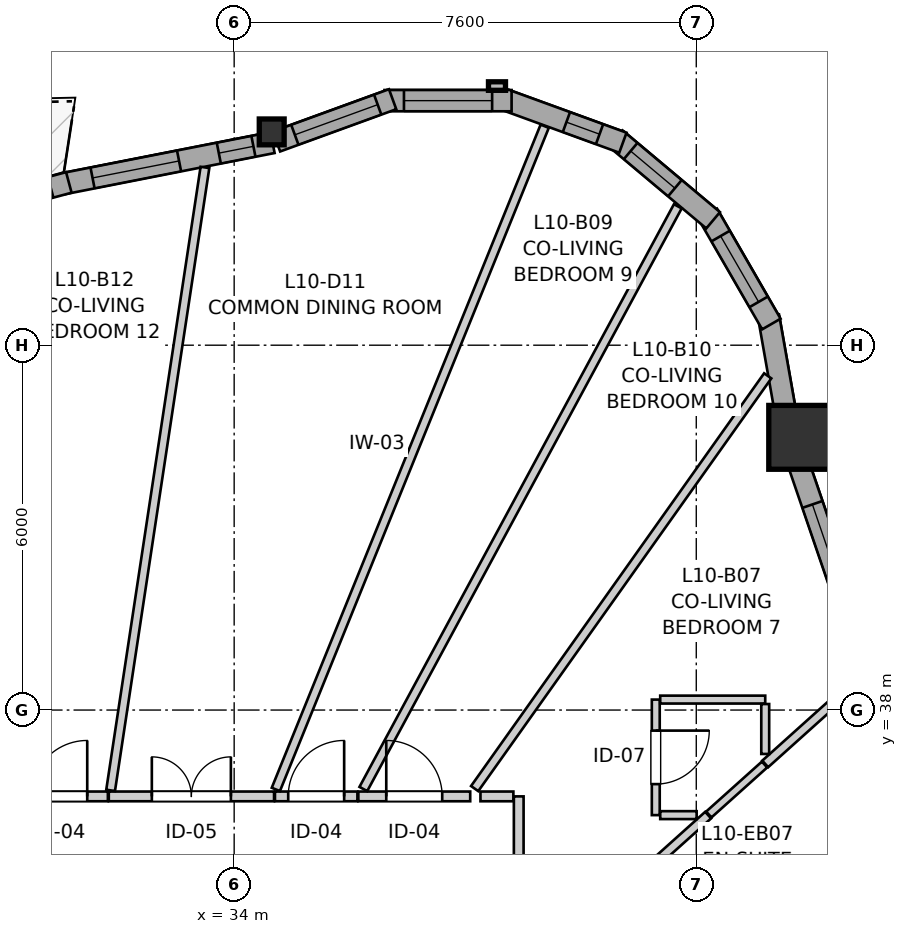
"""IFC4 building model, lengths in metres.
Left out: names, types, materials, properties, quantities, classifications, styles, units other than length and angle.
Written with IfcOpenShell. Run it as: python <this file> out.ifc"""

import sys

from ifc_helpers import new_model, si_unit, direction, frame, frame_2d, origin, origin_2d, place, context, subcontext, project, spatial, rectangle, i_section, extrude, source, transform, mapped, element, fill, save


model = new_model("IFC4")
c1 = context("Model", 3, precision=1e-05, world=origin(), true_north=direction((0.0, 1.0)))
c2 = subcontext(c1, "Body", "Model", "MODEL_VIEW")
j1 = project(units=[si_unit("LENGTHUNIT", "METRE"), si_unit("PLANEANGLEUNIT", "RADIAN")], contexts=[c1])
p1 = place(None, origin())
s1 = spatial("IfcSite", under=j1, at=p1, CompositionType="ELEMENT")
p2 = place(p1, origin())
s2 = spatial("IfcBuilding", under=s1, at=p2, CompositionType="ELEMENT")
p3 = place(p2, frame((0.0, 0.0, 36.6)))
s3 = spatial("IfcBuildingStorey", under=s2, at=p3, CompositionType="ELEMENT", Elevation=36.6)
m1 = source(origin(), c2, "Body", "SweptSolid", [
    extrude(rectangle(XDim=1.05, YDim=1.05, at=origin_2d()), origin(), (0.0, 0.0, 1.0), 2.94),
])
p4 = place(p3, frame((43.317, 42.485, 0.0), z_axis=(0.0, 0.0, 1.0), x_axis=(1.0, 0.0, 0.0)))
e1 = element("IfcColumn", 1, at=p4, inside=s3, PredefinedType="COLUMN", context=c2, shape_type="MappedRepresentation", body=[
    mapped(m1, transform((0.0, 0.0, 0.0), x_axis=(1.0, 0.0, 0.0), y_axis=(0.0, 1.0, 0.0), z_axis=(0.0, 0.0, 1.0), scale=1.0)),
])
m2 = source(origin(), c2, "Body", "SweptSolid", [
    extrude(i_section(OverallWidth=0.409, OverallDepth=0.425, WebThickness=0.03, FlangeThickness=0.048, FilletRadius=0.015, at=origin_2d()), origin(), (0.0, 0.0, 1.0), 2.94),
])
p5 = place(p3, frame((34.617, 47.508, 0.0), z_axis=(0.0, 0.0, 1.0), x_axis=(1.0, 0.0, 0.0)))
e2 = element("IfcColumn", 2, at=p5, inside=s3, PredefinedType="PILASTER", context=c2, shape_type="MappedRepresentation", body=[
    mapped(m2, transform((0.0, 0.0, 0.0), x_axis=(1.0, 0.0, 0.0), y_axis=(0.0, 1.0, 0.0), z_axis=(0.0, 0.0, 1.0), scale=1.0)),
])
p6 = place(p3, frame((44.292, 39.095, 0.0), z_axis=(0.0, 0.0, 1.0), x_axis=(-0.323582370233, 0.946200005112, 0.0)))
e3 = element("IfcWall", 3, at=p6, inside=s3, PredefinedType="SOLIDWALL", context=c2, shape_type="SweptSolid", body=[
    extrude(rectangle(XDim=3.222, YDim=0.35, at=frame_2d((1.611, 0.0))), origin(), (0.0, 0.0, 1.0), 2.42),
])
p7 = place(p6, frame((0.816, 0.0, 0.82)))
e4 = element("IfcOpeningElement", 4, at=p7, cuts=e3, PredefinedType="OPENING", context=c2, shape_type="SweptSolid", body=[
    extrude(rectangle(XDim=1.6, YDim=1.35, at=frame_2d((0.8, 0.675))), frame((0.0, 0.185, 0.0), z_axis=(0.0, -1.0, 0.0), x_axis=(1.0, 0.0, 0.0)), (0.0, 0.0, 1.0), 0.37),
])
p8 = place(p3, frame((43.093, 42.75, 0.0), z_axis=(0.0, 0.0, 1.0), x_axis=(-0.173610462023, 0.984814402553, 0.0)))
e5 = element("IfcWall", 5, at=p8, inside=s3, PredefinedType="SOLIDWALL", context=c2, shape_type="SweptSolid", body=[
    extrude(rectangle(XDim=1.752, YDim=0.35, at=frame_2d((0.876, 0.0))), origin(), (0.0, 0.0, 1.0), 2.42),
])
p9 = place(p3, frame((42.835, 44.348, 0.0), z_axis=(0.0, 0.0, 1.0), x_axis=(-0.499995423472, 0.866028046028, 0.0)))
e6 = element("IfcWall", 6, at=p9, inside=s3, PredefinedType="SOLIDWALL", context=c2, shape_type="SweptSolid", body=[
    extrude(rectangle(XDim=2.09, YDim=0.35, at=frame_2d((1.045, 0.0))), origin(), (0.0, 0.0, 1.0), 2.42),
])
p10 = place(p9, frame((0.42, 0.0, 0.82)))
e7 = element("IfcOpeningElement", 7, at=p10, cuts=e6, PredefinedType="OPENING", context=c2, shape_type="SweptSolid", body=[
    extrude(rectangle(XDim=1.25, YDim=1.35, at=frame_2d((0.625, 0.675))), frame((0.0, 0.185, 0.0), z_axis=(0.0, -1.0, 0.0), x_axis=(1.0, 0.0, 0.0)), (0.0, 0.0, 1.0), 0.37),
])
p11 = place(p3, frame((41.877, 46.054, 0.0), z_axis=(0.0, 0.0, 1.0), x_axis=(-0.766024572719, 0.642811289563, 0.0)))
e8 = element("IfcWall", 8, at=p11, inside=s3, PredefinedType="SOLIDWALL", context=c2, shape_type="SweptSolid", body=[
    extrude(rectangle(XDim=2.09, YDim=0.35, at=frame_2d((1.045, 0.0))), origin(), (0.0, 0.0, 1.0), 2.42),
])
p12 = place(p11, frame((0.821, 0.0, 0.82)))
e9 = element("IfcOpeningElement", 9, at=p12, cuts=e8, PredefinedType="OPENING", context=c2, shape_type="SweptSolid", body=[
    extrude(rectangle(XDim=0.95, YDim=1.35, at=frame_2d((0.475, 0.675))), frame((0.0, 0.185, 0.0), z_axis=(0.0, -1.0, 0.0), x_axis=(1.0, 0.0, 0.0)), (0.0, 0.0, 1.0), 0.37),
])
p13 = place(p3, frame((40.393, 47.33, 0.0), z_axis=(0.0, 0.0, 1.0), x_axis=(-0.939660353162, 0.342108784886, 0.0)))
e10 = element("IfcWall", 10, at=p13, inside=s3, PredefinedType="SOLIDWALL", context=c2, shape_type="SweptSolid", body=[
    extrude(rectangle(XDim=2.09, YDim=0.35, at=frame_2d((1.045, 0.0))), origin(), (0.0, 0.0, 1.0), 2.42),
])
p14 = place(p13, frame((0.409, 0.0, 0.82)))
e11 = element("IfcOpeningElement", 11, at=p14, cuts=e10, PredefinedType="OPENING", context=c2, shape_type="SweptSolid", body=[
    extrude(rectangle(XDim=0.58, YDim=1.35, at=frame_2d((0.29, 0.675))), frame((0.0, 0.185, 0.0), z_axis=(0.0, -1.0, 0.0), x_axis=(1.0, 0.0, 0.0)), (0.0, 0.0, 1.0), 0.37),
])
p15 = place(p3, frame((38.563, 48.022, 0.0), z_axis=(0.0, 0.0, 1.0), x_axis=(-1.0, 0.0, 0.0)))
e12 = element("IfcWall", 12, at=p15, inside=s3, PredefinedType="SOLIDWALL", context=c2, shape_type="SweptSolid", body=[
    extrude(rectangle(XDim=2.09, YDim=0.35, at=frame_2d((1.045, 0.0))), origin(), (0.0, 0.0, 1.0), 2.42),
])
p16 = place(p15, frame((0.32, 0.0, 0.82)))
e13 = element("IfcOpeningElement", 13, at=p16, cuts=e12, PredefinedType="OPENING", context=c2, shape_type="SweptSolid", body=[
    extrude(rectangle(XDim=1.45, YDim=1.25, at=frame_2d((0.725, 0.625))), frame((0.0, 0.185, 0.0), z_axis=(0.0, -1.0, 0.0), x_axis=(1.0, 0.0, 0.0)), (0.0, 0.0, 1.0), 0.37),
])
p17 = place(p3, frame((36.606, 48.045, 0.0), z_axis=(0.0, 0.0, 1.0), x_axis=(-0.939653047052, -0.342128851701, 0.0)))
e14 = element("IfcWall", 14, at=p17, inside=s3, PredefinedType="SOLIDWALL", context=c2, shape_type="SweptSolid", body=[
    extrude(rectangle(XDim=2.032, YDim=0.35, at=frame_2d((1.016, 0.0))), origin(), (0.0, 0.0, 1.0), 2.42),
])
p18 = place(p17, frame((0.261, 0.0, 0.82)))
e15 = element("IfcOpeningElement", 15, at=p18, cuts=e14, PredefinedType="OPENING", context=c2, shape_type="SweptSolid", body=[
    extrude(rectangle(XDim=1.45, YDim=1.25, at=frame_2d((0.725, 0.625))), frame((0.0, 0.185, 0.0), z_axis=(0.0, -1.0, 0.0), x_axis=(1.0, 0.0, 0.0)), (0.0, 0.0, 1.0), 0.37),
])
p19 = place(p3, frame((34.632, 47.332, 0.0), z_axis=(0.0, 0.0, 1.0), x_axis=(-0.981234691866, -0.192817217796, 0.0)))
e16 = element("IfcWall", 16, at=p19, inside=s3, PredefinedType="SOLIDWALL", context=c2, shape_type="SweptSolid", body=[
    extrude(rectangle(XDim=3.502, YDim=0.35, at=frame_2d((1.751, 0.0))), origin(), (0.0, 0.0, 1.0), 2.42),
])
p20 = place(p19, frame((0.321, 0.0, 0.82)))
e17 = element("IfcOpeningElement", 17, at=p20, cuts=e16, PredefinedType="OPENING", context=c2, shape_type="SweptSolid", body=[
    extrude(rectangle(XDim=0.58, YDim=1.35, at=frame_2d((0.29, 0.675))), frame((0.0, 0.185, 0.0), z_axis=(0.0, -1.0, 0.0), x_axis=(1.0, 0.0, 0.0)), (0.0, 0.0, 1.0), 0.37),
])
p21 = place(p19, frame((1.567, 0.0, 0.82)))
e18 = element("IfcOpeningElement", 18, at=p21, cuts=e16, PredefinedType="OPENING", context=c2, shape_type="SweptSolid", body=[
    extrude(rectangle(XDim=1.45, YDim=1.25, at=frame_2d((0.725, 0.625))), frame((0.0, 0.185, 0.0), z_axis=(0.0, -1.0, 0.0), x_axis=(1.0, 0.0, 0.0)), (0.0, 0.0, 1.0), 0.37),
])
p22 = place(p3, frame((31.281, 46.677, 0.0), z_axis=(0.0, 0.0, 1.0), x_axis=(-0.965445661484, -0.260604441101, 0.0)))
e19 = element("IfcWall", 19, at=p22, inside=s3, PredefinedType="SOLIDWALL", context=c2, shape_type="SweptSolid", body=[
    extrude(rectangle(XDim=3.15, YDim=0.35, at=frame_2d((1.575, 0.0))), origin(), (0.0, 0.0, 1.0), 2.42),
])
p23 = place(p22, frame((0.31, 0.0, 0.82)))
e20 = element("IfcOpeningElement", 20, at=p23, cuts=e19, PredefinedType="OPENING", context=c2, shape_type="SweptSolid", body=[
    extrude(rectangle(XDim=0.58, YDim=1.35, at=frame_2d((0.29, 0.675))), frame((0.0, 0.185, 0.0), z_axis=(0.0, -1.0, 0.0), x_axis=(1.0, 0.0, 0.0)), (0.0, 0.0, 1.0), 0.37),
])
p24 = place(p22, frame((1.215, 0.0, 0.82)))
e21 = element("IfcOpeningElement", 21, at=p24, cuts=e19, PredefinedType="OPENING", context=c2, shape_type="SweptSolid", body=[
    extrude(rectangle(XDim=1.45, YDim=1.25, at=frame_2d((0.725, 0.625))), frame((0.0, 0.185, 0.0), z_axis=(0.0, -1.0, 0.0), x_axis=(1.0, 0.0, 0.0)), (0.0, 0.0, 1.0), 0.37),
])
p25 = place(p3, frame((38.68, 36.58, 0.0), z_axis=(0.0, 0.0, 1.0), x_axis=(0.0, -1.0, 0.0)))
e22 = element("IfcWall", 22, at=p25, inside=s3, PredefinedType="PARTITIONING", context=c2, shape_type="SweptSolid", body=[
    extrude(rectangle(XDim=3.069, YDim=0.16, at=frame_2d((1.535, 0.0))), origin(), (0.0, 0.0, 1.0), 2.94),
])
p26 = place(p25, frame((1.092, 0.0, 0.0)))
e23 = element("IfcOpeningElement", 23, at=p26, cuts=e22, PredefinedType="OPENING", context=c2, shape_type="SweptSolid", body=[
    extrude(rectangle(XDim=0.92, YDim=2.1, at=frame_2d((0.46, 1.05))), frame((0.0, 0.09, 0.0), z_axis=(0.0, -1.0, 0.0), x_axis=(1.0, 0.0, 0.0)), (0.0, 0.0, 1.0), 0.18),
])
p27 = place(p3, frame((31.938, 36.58, 0.0), z_axis=(0.0, 0.0, 1.0), x_axis=(1.0, 0.0, 0.0)))
e24 = element("IfcWall", 24, at=p27, inside=s3, PredefinedType="PARTITIONING", context=c2, shape_type="SweptSolid", body=[
    extrude(rectangle(XDim=2.718, YDim=0.16, at=frame_2d((1.359, 0.0))), origin(), (0.0, 0.0, 1.0), 2.94),
])
p28 = place(p27, frame((0.708, 0.0, 0.0)))
e25 = element("IfcOpeningElement", 25, at=p28, cuts=e24, PredefinedType="OPENING", context=c2, shape_type="SweptSolid", body=[
    extrude(rectangle(XDim=1.3, YDim=2.1, at=frame_2d((0.65, 1.05))), frame((0.0, 0.09, 0.0), z_axis=(0.0, -1.0, 0.0), x_axis=(1.0, 0.0, 0.0)), (0.0, 0.0, 1.0), 0.18),
])
p29 = place(p3, frame((40.934, 38.172, 0.0), z_axis=(0.0, 0.0, 1.0), x_axis=(0.0, -1.0, 0.0)))
e26 = element("IfcWall", 26, at=p29, inside=s3, PredefinedType="PARTITIONING", context=c2, shape_type="SweptSolid", body=[
    extrude(rectangle(XDim=1.9, YDim=0.13, at=frame_2d((0.95, 0.0))), origin(), (0.0, 0.0, 1.0), 2.94),
])
p30 = place(p29, frame((0.51, 0.0, 0.0)))
e27 = element("IfcOpeningElement", 27, at=p30, cuts=e26, PredefinedType="OPENING", context=c2, shape_type="SweptSolid", body=[
    extrude(rectangle(XDim=0.88, YDim=2.05, at=frame_2d((0.44, 1.025))), frame((0.0, 0.075, 0.0), z_axis=(0.0, -1.0, 0.0), x_axis=(1.0, 0.0, 0.0)), (0.0, 0.0, 1.0), 0.15),
])
p31 = place(p3, frame((36.042, 36.58, 0.0), z_axis=(0.0, 0.0, 1.0), x_axis=(1.0, 0.0, 0.0)))
e28 = element("IfcWall", 28, at=p31, inside=s3, PredefinedType="PARTITIONING", context=c2, shape_type="SweptSolid", body=[
    extrude(rectangle(XDim=1.84, YDim=0.16, at=frame_2d((0.92, 0.0))), origin(), (0.0, 0.0, 1.0), 2.94),
])
p32 = place(p31, frame((0.459, 0.0, 0.0)))
e29 = element("IfcOpeningElement", 29, at=p32, cuts=e28, PredefinedType="OPENING", context=c2, shape_type="SweptSolid", body=[
    extrude(rectangle(XDim=0.92, YDim=2.1, at=frame_2d((0.46, 1.05))), frame((0.0, 0.09, 0.0), z_axis=(0.0, -1.0, 0.0), x_axis=(1.0, 0.0, 0.0)), (0.0, 0.0, 1.0), 0.18),
])
p33 = place(p3, frame((30.324, 36.58, 0.0), z_axis=(0.0, 0.0, 1.0), x_axis=(1.0, 0.0, 0.0)))
e30 = element("IfcWall", 30, at=p33, inside=s3, PredefinedType="PARTITIONING", context=c2, shape_type="SweptSolid", body=[
    extrude(rectangle(XDim=1.599, YDim=0.16, at=frame_2d((0.8, 0.0))), origin(), (0.0, 0.0, 1.0), 2.94),
])
p34 = place(p33, frame((0.34, 0.0, 0.0)))
e31 = element("IfcOpeningElement", 31, at=p34, cuts=e30, PredefinedType="OPENING", context=c2, shape_type="SweptSolid", body=[
    extrude(rectangle(XDim=0.92, YDim=2.1, at=frame_2d((0.46, 1.05))), frame((0.0, 0.09, 0.0), z_axis=(0.0, -1.0, 0.0), x_axis=(1.0, 0.0, 0.0)), (0.0, 0.0, 1.0), 0.18),
])
p35 = place(p3, frame((34.671, 36.58, 0.0), z_axis=(0.0, 0.0, 1.0), x_axis=(1.0, 0.0, 0.0)))
e32 = element("IfcWall", 32, at=p35, inside=s3, PredefinedType="PARTITIONING", context=c2, shape_type="SweptSolid", body=[
    extrude(rectangle(XDim=1.356, YDim=0.16, at=frame_2d((0.678, 0.0))), origin(), (0.0, 0.0, 1.0), 2.94),
])
p36 = place(p35, frame((0.218, 0.0, 0.0)))
e33 = element("IfcOpeningElement", 33, at=p36, cuts=e32, PredefinedType="OPENING", context=c2, shape_type="SweptSolid", body=[
    extrude(rectangle(XDim=0.92, YDim=2.1, at=frame_2d((0.46, 1.05))), frame((0.0, 0.09, 0.0), z_axis=(0.0, -1.0, 0.0), x_axis=(1.0, 0.0, 0.0)), (0.0, 0.0, 1.0), 0.18),
])
p37 = place(p3, frame((34.686, 36.695, 0.0), z_axis=(0.0, 0.0, 1.0), x_axis=(0.375735926904, 0.926726773776, 0.0)))
e34 = element("IfcWall", 34, at=p37, inside=s3, PredefinedType="PARTITIONING", context=c2, shape_type="SweptSolid", body=[
    extrude(rectangle(XDim=11.769, YDim=0.145, at=frame_2d((5.884, 0.0))), origin(), (0.0, 0.0, 1.0), 2.94),
])
p38 = place(p3, frame((36.125, 36.701, 0.0), z_axis=(0.0, 0.0, 1.0), x_axis=(0.474948586069, 0.880013545686, 0.0)))
e35 = element("IfcWall", 35, at=p38, inside=s3, PredefinedType="PARTITIONING", context=c2, shape_type="SweptSolid", body=[
    extrude(rectangle(XDim=10.889, YDim=0.145, at=frame_2d((5.445, 0.0))), origin(), (0.0, 0.0, 1.0), 2.94),
])
p39 = place(p3, frame((31.968, 36.679, 0.0), z_axis=(0.0, 0.0, 1.0), x_axis=(0.149735581821, 0.9887260771, 0.0)))
e36 = element("IfcWall", 36, at=p39, inside=s3, PredefinedType="PARTITIONING", context=c2, shape_type="SweptSolid", body=[
    extrude(rectangle(XDim=10.362, YDim=0.145, at=frame_2d((5.181, 0.0))), origin(), (0.0, 0.0, 1.0), 2.94),
])
p40 = place(p3, frame((37.955, 36.708, 0.0), z_axis=(0.0, 0.0, 1.0), x_axis=(0.578991718582, 0.81533342248, 0.0)))
e37 = element("IfcWall", 37, at=p40, inside=s3, PredefinedType="PARTITIONING", context=c2, shape_type="SweptSolid", body=[
    extrude(rectangle(XDim=8.325, YDim=0.145, at=frame_2d((4.163, 0.0))), origin(), (0.0, 0.0, 1.0), 2.94),
])
p41 = place(p3, frame((38.814, 33.597, 0.0), z_axis=(0.0, 0.0, 1.0), x_axis=(0.74417856937, 0.667980730927, 0.0)))
e38 = element("IfcWall", 38, at=p41, inside=s3, PredefinedType="PARTITIONING", context=c2, shape_type="SweptSolid", body=[
    extrude(rectangle(XDim=4.005, YDim=0.145, at=frame_2d((2.002, 0.0))), origin(), (0.0, 0.0, 1.0), 2.94),
])
p42 = place(p3, frame((42.734, 37.114, 0.0), z_axis=(0.0, 0.0, 1.0), x_axis=(0.743962922365, 0.668220899214, 0.0)))
e39 = element("IfcWall", 39, at=p42, inside=s3, PredefinedType="PARTITIONING", context=c2, shape_type="SweptSolid", body=[
    extrude(rectangle(XDim=2.05, YDim=0.145, at=frame_2d((1.025, 0.0))), origin(), (0.0, 0.0, 1.0), 2.94),
])
p43 = place(p3, frame((41.007, 38.172, 0.0), z_axis=(0.0, 0.0, 1.0), x_axis=(1.0, 0.0, 0.0)))
e40 = element("IfcWall", 40, at=p43, inside=s3, PredefinedType="PARTITIONING", context=c2, shape_type="SweptSolid", body=[
    extrude(rectangle(XDim=1.727, YDim=0.13, at=frame_2d((0.863, 0.0))), origin(), (0.0, 0.0, 1.0), 2.94),
])
p44 = place(p3, frame((41.806, 36.282, 0.0), z_axis=(0.0, 0.0, 1.0), x_axis=(0.744525261569, 0.667594289135, 0.0)))
e41 = element("IfcWall", 41, at=p44, inside=s3, PredefinedType="PARTITIONING", context=c2, shape_type="SweptSolid", body=[
    extrude(rectangle(XDim=1.231, YDim=0.13, at=frame_2d((0.616, 0.0))), origin(), (0.0, 0.0, 1.0), 2.94),
])
p45 = place(p3, frame((42.734, 37.278, 0.0), z_axis=(0.0, 0.0, 1.0), x_axis=(0.0, 1.0, 0.0)))
e42 = element("IfcWall", 42, at=p45, inside=s3, PredefinedType="PARTITIONING", context=c2, shape_type="SweptSolid", body=[
    extrude(rectangle(XDim=0.821, YDim=0.13, at=frame_2d((0.411, 0.0))), origin(), (0.0, 0.0, 1.0), 2.94),
])
p46 = place(p3, frame((41.007, 36.272, 0.0), z_axis=(0.0, 0.0, 1.0), x_axis=(1.0, 0.0, 0.0)))
e43 = element("IfcWall", 43, at=p46, inside=s3, PredefinedType="PARTITIONING", context=c2, shape_type="SweptSolid", body=[
    extrude(rectangle(XDim=0.599, YDim=0.13, at=frame_2d((0.299, 0.0))), origin(), (0.0, 0.0, 1.0), 2.94),
])
p47 = place(p3, frame((38.051, 36.58, 0.0), z_axis=(0.0, 0.0, 1.0), x_axis=(1.0, 0.0, 0.0)))
e44 = element("IfcWall", 44, at=p47, inside=s3, PredefinedType="PARTITIONING", context=c2, shape_type="SweptSolid", body=[
    extrude(rectangle(XDim=0.541, YDim=0.16, at=frame_2d((0.271, 0.0))), origin(), (0.0, 0.0, 1.0), 2.94),
])
m3 = source(origin(), c2, "Body", "SweptSolid", [
    extrude(rectangle(XDim=1.6, YDim=1.35, at=frame_2d((0.8, 0.675))), frame((0.0, 0.03, 0.0), z_axis=(0.0, -1.0, 0.0), x_axis=(1.0, 0.0, 0.0)), (0.0, 0.0, 1.0), 0.06),
])
p48 = place(p7, origin())
e45 = element("IfcWindow", 45, at=p48, inside=s3, PartitioningType="SINGLE_PANEL", PredefinedType="WINDOW", context=c2, shape_type="MappedRepresentation", body=[
    mapped(m3, transform((0.0, 0.0, 0.0), x_axis=(1.0, 0.0, 0.0), y_axis=(0.0, 1.0, 0.0), z_axis=(0.0, 0.0, 1.0), scale=1.0)),
])
fill(e4, e45)
m4 = source(origin(), c2, "Body", "SweptSolid", [
    extrude(rectangle(XDim=1.25, YDim=1.35, at=frame_2d((0.625, 0.675))), frame((0.0, 0.03, 0.0), z_axis=(0.0, -1.0, 0.0), x_axis=(1.0, 0.0, 0.0)), (0.0, 0.0, 1.0), 0.06),
])
p49 = place(p10, origin())
e46 = element("IfcWindow", 46, at=p49, inside=s3, PartitioningType="SINGLE_PANEL", PredefinedType="WINDOW", context=c2, shape_type="MappedRepresentation", body=[
    mapped(m4, transform((0.0, 0.0, 0.0), x_axis=(1.0, 0.0, 0.0), y_axis=(0.0, 1.0, 0.0), z_axis=(0.0, 0.0, 1.0), scale=1.0)),
])
fill(e7, e46)
m5 = source(origin(), c2, "Body", "SweptSolid", [
    extrude(rectangle(XDim=0.95, YDim=1.35, at=frame_2d((0.475, 0.675))), frame((0.0, 0.03, 0.0), z_axis=(0.0, -1.0, 0.0), x_axis=(1.0, 0.0, 0.0)), (0.0, 0.0, 1.0), 0.06),
])
p50 = place(p12, origin())
e47 = element("IfcWindow", 47, at=p50, inside=s3, PartitioningType="SINGLE_PANEL", PredefinedType="WINDOW", context=c2, shape_type="MappedRepresentation", body=[
    mapped(m5, transform((0.0, 0.0, 0.0), x_axis=(1.0, 0.0, 0.0), y_axis=(0.0, 1.0, 0.0), z_axis=(0.0, 0.0, 1.0), scale=1.0)),
])
fill(e9, e47)
m6 = source(origin(), c2, "Body", "SweptSolid", [
    extrude(rectangle(XDim=0.58, YDim=1.35, at=frame_2d((0.29, 0.675))), frame((0.0, 0.03, 0.0), z_axis=(0.0, -1.0, 0.0), x_axis=(1.0, 0.0, 0.0)), (0.0, 0.0, 1.0), 0.06),
])
p51 = place(p14, origin())
e48 = element("IfcWindow", 48, at=p51, inside=s3, PartitioningType="SINGLE_PANEL", PredefinedType="WINDOW", context=c2, shape_type="MappedRepresentation", body=[
    mapped(m6, transform((0.0, 0.0, 0.0), x_axis=(1.0, 0.0, 0.0), y_axis=(0.0, 1.0, 0.0), z_axis=(0.0, 0.0, 1.0), scale=1.0)),
])
fill(e11, e48)
m7 = source(origin(), c2, "Body", "SweptSolid", [
    extrude(rectangle(XDim=1.45, YDim=1.25, at=frame_2d((0.725, 0.625))), frame((0.0, 0.03, 0.0), z_axis=(0.0, -1.0, 0.0), x_axis=(1.0, 0.0, 0.0)), (0.0, 0.0, 1.0), 0.06),
])
p52 = place(p16, origin())
e49 = element("IfcWindow", 49, at=p52, inside=s3, PartitioningType="SINGLE_PANEL", PredefinedType="WINDOW", context=c2, shape_type="MappedRepresentation", body=[
    mapped(m7, transform((0.0, 0.0, 0.0), x_axis=(1.0, 0.0, 0.0), y_axis=(0.0, 1.0, 0.0), z_axis=(0.0, 0.0, 1.0), scale=1.0)),
])
fill(e13, e49)
p53 = place(p18, origin())
e50 = element("IfcWindow", 50, at=p53, inside=s3, PartitioningType="SINGLE_PANEL", PredefinedType="WINDOW", context=c2, shape_type="MappedRepresentation", body=[
    mapped(m7, transform((0.0, 0.0, 0.0), x_axis=(1.0, 0.0, 0.0), y_axis=(0.0, 1.0, 0.0), z_axis=(0.0, 0.0, 1.0), scale=1.0)),
])
fill(e15, e50)
p54 = place(p20, origin())
e51 = element("IfcWindow", 51, at=p54, inside=s3, PartitioningType="SINGLE_PANEL", PredefinedType="WINDOW", context=c2, shape_type="MappedRepresentation", body=[
    mapped(m6, transform((0.0, 0.0, 0.0), x_axis=(1.0, 0.0, 0.0), y_axis=(0.0, 1.0, 0.0), z_axis=(0.0, 0.0, 1.0), scale=1.0)),
])
fill(e17, e51)
p55 = place(p21, origin())
e52 = element("IfcWindow", 52, at=p55, inside=s3, PartitioningType="SINGLE_PANEL", PredefinedType="WINDOW", context=c2, shape_type="MappedRepresentation", body=[
    mapped(m7, transform((0.0, 0.0, 0.0), x_axis=(1.0, 0.0, 0.0), y_axis=(0.0, 1.0, 0.0), z_axis=(0.0, 0.0, 1.0), scale=1.0)),
])
fill(e18, e52)
m8 = source(origin(), c2, "Body", "SweptSolid", [
    extrude(rectangle(XDim=1.3, YDim=2.1, at=frame_2d((0.65, 1.05))), frame((0.0, 0.025, 0.0), z_axis=(0.0, -1.0, 0.0), x_axis=(1.0, 0.0, 0.0)), (0.0, 0.0, 1.0), 0.05),
])
p56 = place(p28, origin())
e53 = element("IfcDoor", 53, at=p56, inside=s3, OperationType="DOUBLE_DOOR_SINGLE_SWING", PredefinedType="DOOR", context=c2, shape_type="MappedRepresentation", body=[
    mapped(m8, transform((0.0, 0.0, 0.0), x_axis=(1.0, 0.0, 0.0), y_axis=(0.0, 1.0, 0.0), z_axis=(0.0, 0.0, 1.0), scale=1.0)),
])
fill(e25, e53)
m9 = source(origin(), c2, "Body", "SweptSolid", [
    extrude(rectangle(XDim=0.88, YDim=2.05, at=frame_2d((0.44, 1.025))), frame((0.0, 0.025, 0.0), z_axis=(0.0, -1.0, 0.0), x_axis=(1.0, 0.0, 0.0)), (0.0, 0.0, 1.0), 0.05),
])
p57 = place(p30, origin())
e54 = element("IfcDoor", 54, at=p57, inside=s3, OperationType="SINGLE_SWING_LEFT", PredefinedType="DOOR", context=c2, shape_type="MappedRepresentation", body=[
    mapped(m9, transform((0.0, 0.0, 0.0), x_axis=(1.0, 0.0, 0.0), y_axis=(0.0, 1.0, 0.0), z_axis=(0.0, 0.0, 1.0), scale=1.0)),
])
fill(e27, e54)
m10 = source(origin(), c2, "Body", "SweptSolid", [
    extrude(rectangle(XDim=0.92, YDim=2.1, at=frame_2d((0.46, 1.05))), frame((0.0, 0.025, 0.0), z_axis=(0.0, -1.0, 0.0), x_axis=(1.0, 0.0, 0.0)), (0.0, 0.0, 1.0), 0.05),
])
p58 = place(p32, origin())
e55 = element("IfcDoor", 55, at=p58, inside=s3, OperationType="SINGLE_SWING_LEFT", PredefinedType="DOOR", context=c2, shape_type="MappedRepresentation", body=[
    mapped(m10, transform((0.0, 0.0, 0.0), x_axis=(1.0, 0.0, 0.0), y_axis=(0.0, 1.0, 0.0), z_axis=(0.0, 0.0, 1.0), scale=1.0)),
])
fill(e29, e55)
p59 = place(p34, origin())
e56 = element("IfcDoor", 56, at=p59, inside=s3, OperationType="SINGLE_SWING_RIGHT", PredefinedType="DOOR", context=c2, shape_type="MappedRepresentation", body=[
    mapped(m10, transform((0.0, 0.0, 0.0), x_axis=(1.0, 0.0, 0.0), y_axis=(0.0, 1.0, 0.0), z_axis=(0.0, 0.0, 1.0), scale=1.0)),
])
fill(e31, e56)
p60 = place(p36, origin())
e57 = element("IfcDoor", 57, at=p60, inside=s3, OperationType="SINGLE_SWING_RIGHT", PredefinedType="DOOR", context=c2, shape_type="MappedRepresentation", body=[
    mapped(m10, transform((0.0, 0.0, 0.0), x_axis=(1.0, 0.0, 0.0), y_axis=(0.0, 1.0, 0.0), z_axis=(0.0, 0.0, 1.0), scale=1.0)),
])
fill(e33, e57)
save(model, sys.argv[1])
